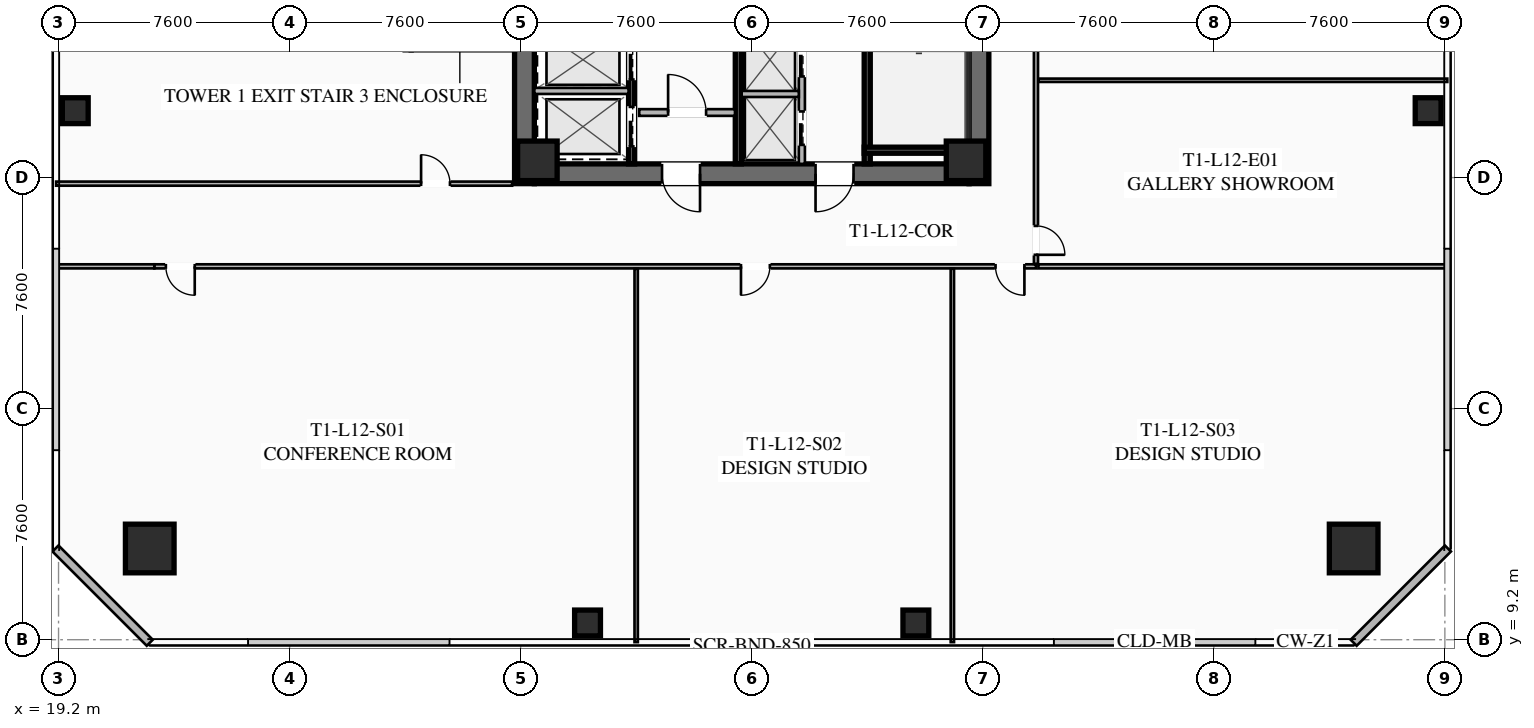
"""IFC4 building model, lengths in metres.
Left out: names, types, materials, properties, quantities, classifications, styles, units other than length and angle.
Written with IfcOpenShell. Run it as: python <this file> out.ifc"""

import sys

from ifc_helpers import new_model, si_unit, direction, frame, frame_2d, origin, origin_2d, place, context, subcontext, project, spatial, rectangle, hollow_rectangle, extrude, element, fill, save


model = new_model("IFC4")
c1 = context("Model", 3, precision=1e-05, world=origin(), true_north=direction((0.0, 1.0)))
c2 = subcontext(c1, "Body", "Model", "MODEL_VIEW")
j1 = project(units=[si_unit("LENGTHUNIT", "METRE"), si_unit("PLANEANGLEUNIT", "RADIAN")], contexts=[c1])
p1 = place(None, origin())
s1 = spatial("IfcSite", under=j1, at=p1, CompositionType="ELEMENT")
p2 = place(p1, origin())
s2 = spatial("IfcBuilding", under=s1, at=p2, CompositionType="ELEMENT")
p3 = place(p2, frame((0.0, 0.0, 49.45)))
s3 = spatial("IfcBuildingStorey", under=s2, at=p3, CompositionType="ELEMENT", Elevation=49.45)
for number, where, z_axis, x_axis in (
    (1, (34.525, 24.2, 0.0), (0.0, 0.0, 1.0), (0.0, 1.0, 0.0)),
    (2, (49.475, 39.8, 0.0), (0.0, 0.0, 1.0), (0.0, -1.0, 0.0)),
):
    element("IfcWall", number, at=place(p3, frame(where, z_axis=z_axis, x_axis=x_axis)), inside=s3, PredefinedType="SHEAR", context=c2, shape_type="SweptSolid", body=[
        extrude(rectangle(XDim=15.6, YDim=0.65, at=frame_2d((7.8, 0.0))), origin(), (0.0, 0.0, 1.0), 3.55),
    ])
p4 = place(p3, frame((49.15, 24.525, 0.0), z_axis=(0.0, 0.0, 1.0), x_axis=(-1.0, 0.0, 0.0)))
e3 = element("IfcWall", 3, at=p4, inside=s3, PredefinedType="SHEAR", context=c2, shape_type="SweptSolid", body=[
    extrude(rectangle(XDim=14.3, YDim=0.65, at=frame_2d((7.15, 0.0))), origin(), (0.0, 0.0, 1.0), 3.55),
])
p5 = place(p4, frame((8.85, 0.0, 0.0)))
e4 = element("IfcOpeningElement", 4, at=p5, cuts=e3, PredefinedType="OPENING", context=c2, shape_type="SweptSolid", body=[
    extrude(rectangle(XDim=1.25, YDim=2.25, at=frame_2d((0.625, 1.125))), frame((0.0, 0.335, 0.0), z_axis=(0.0, -1.0, 0.0), x_axis=(1.0, 0.0, 0.0)), (0.0, 0.0, 1.0), 0.67),
])
p6 = place(p4, frame((3.8, 0.0, 0.0)))
e5 = element("IfcOpeningElement", 5, at=p6, cuts=e3, PredefinedType="OPENING", context=c2, shape_type="SweptSolid", body=[
    extrude(rectangle(XDim=1.25, YDim=2.25, at=frame_2d((0.625, 1.125))), frame((0.0, 0.335, 0.0), z_axis=(0.0, -1.0, 0.0), x_axis=(1.0, 0.0, 0.0)), (0.0, 0.0, 1.0), 0.67),
])
for number, where, z_axis, x_axis in (
    (6, (34.95, 24.95, 0.0), (0.0, 0.0, 1.0), (1.0, 0.0, 0.0)),
    (7, (49.05, 24.95, 0.0), (0.0, 0.0, 1.0), (1.0, 0.0, 0.0)),
):
    element("IfcColumn", number, at=place(p3, frame(where, z_axis=z_axis, x_axis=x_axis)), inside=s3, PredefinedType="COLUMN", context=c2, shape_type="SweptSolid", body=[
        extrude(hollow_rectangle(XDim=1.3, YDim=1.3, WallThickness=0.05, at=origin_2d()), origin(), (0.0, 0.0, 1.0), 3.35),
    ])
for number, where, z_axis, x_axis in (
    (8, (22.2, 12.2, 0.0), (0.0, 0.0, 1.0), (1.0, 0.0, 0.0)),
    (9, (61.8, 12.2, 0.0), (0.0, 0.0, 1.0), (1.0, 0.0, 0.0)),
):
    element("IfcColumn", number, at=place(p3, frame(where, z_axis=z_axis, x_axis=x_axis)), inside=s3, PredefinedType="COLUMN", context=c2, shape_type="SweptSolid", body=[
        extrude(hollow_rectangle(XDim=1.6, YDim=1.6, WallThickness=0.06, at=origin_2d()), origin(), (0.0, 0.0, 1.0), 3.35),
    ])
for number, where, z_axis, x_axis in (
    (10, (36.6, 9.75, 0.0), (0.0, 0.0, 1.0), (1.0, 0.0, 0.0)),
    (11, (47.4, 9.75, 0.0), (0.0, 0.0, 1.0), (1.0, 0.0, 0.0)),
    (12, (64.25, 26.6, 0.0), (0.0, 0.0, 1.0), (1.0, 0.0, 0.0)),
    (13, (19.75, 26.6, 0.0), (0.0, 0.0, 1.0), (1.0, 0.0, 0.0)),
):
    element("IfcColumn", number, at=place(p3, frame(where, z_axis=z_axis, x_axis=x_axis)), inside=s3, PredefinedType="COLUMN", context=c2, shape_type="SweptSolid", body=[
        extrude(hollow_rectangle(XDim=0.85, YDim=0.85, WallThickness=0.035, at=origin_2d()), origin(), (0.0, 0.0, 1.0), 3.35),
    ])
for number, where, z_axis, x_axis in (
    (14, (22.2, 9.1, 0.0), (0.0, 0.0, 1.0), (-0.707, 0.707, 0.0)),
    (15, (64.9, 12.2, 0.0), (0.0, 0.0, 1.0), (-0.707, -0.707, 0.0)),
):
    element("IfcWall", number, at=place(p3, frame(where, z_axis=z_axis, x_axis=x_axis)), inside=s3, PredefinedType="SOLIDWALL", context=c2, shape_type="SweptSolid", body=[
        extrude(rectangle(XDim=4.384, YDim=0.28, at=frame_2d((2.192, 0.0))), origin(), (0.0, 0.0, 1.0), 3.35),
    ])
p7 = place(p3, frame((45.8, 32.8, 0.0), z_axis=(0.0, 0.0, 1.0), x_axis=(0.0, -1.0, 0.0)))
e16 = element("IfcWall", 16, at=p7, inside=s3, PredefinedType="SHEAR", context=c2, shape_type="SweptSolid", body=[
    extrude(rectangle(XDim=7.95, YDim=0.2, at=frame_2d((3.975, 0.0))), origin(), (0.0, 0.0, 1.0), 3.35),
])
p8 = place(p7, frame((0.45, 0.0, 0.0)))
e17 = element("IfcOpeningElement", 17, at=p8, cuts=e16, PredefinedType="OPENING", context=c2, shape_type="SweptSolid", body=[
    extrude(rectangle(XDim=1.15, YDim=2.2, at=frame_2d((0.575, 1.1))), frame((0.0, 0.11, 0.0), z_axis=(0.0, -1.0, 0.0), x_axis=(1.0, 0.0, 0.0)), (0.0, 0.0, 1.0), 0.22),
])
p9 = place(p3, frame((45.7, 25.3, 0.0), z_axis=(0.0, 0.0, 1.0), x_axis=(1.0, 0.0, 0.0)))
e18 = element("IfcWall", 18, at=p9, inside=s3, PredefinedType="SHEAR", context=c2, shape_type="SweptSolid", body=[
    extrude(rectangle(XDim=3.45, YDim=0.2, at=frame_2d((1.725, 0.0))), origin(), (0.0, 0.0, 1.0), 3.35),
])
p10 = place(p3, frame((41.56, 24.85, 0.0), z_axis=(0.0, 0.0, 1.0), x_axis=(0.0, 1.0, 0.0)))
e19 = element("IfcWall", 19, at=p10, inside=s3, PredefinedType="SHEAR", context=c2, shape_type="SweptSolid", body=[
    extrude(rectangle(XDim=14.3, YDim=0.2, at=frame_2d((7.15, 0.0))), origin(), (0.0, 0.0, 1.0), 3.35),
])
p11 = place(p3, frame((38.3, 26.54, 0.0), z_axis=(0.0, 0.0, 1.0), x_axis=(1.0, 0.0, 0.0)))
e20 = element("IfcWall", 20, at=p11, inside=s3, PredefinedType="SOLIDWALL", context=c2, shape_type="SweptSolid", body=[
    extrude(rectangle(XDim=3.15, YDim=0.22, at=frame_2d((1.575, 0.0))), origin(), (0.0, 0.0, 1.0), 2.703),
])
p12 = place(p11, frame((0.95, 0.0, 0.0)))
e21 = element("IfcOpeningElement", 21, at=p12, cuts=e20, PredefinedType="OPENING", context=c2, shape_type="SweptSolid", body=[
    extrude(rectangle(XDim=1.25, YDim=2.25, at=frame_2d((0.625, 1.125))), frame((0.0, 0.12, 0.0), z_axis=(0.0, -1.0, 0.0), x_axis=(1.0, 0.0, 0.0)), (0.0, 0.0, 1.0), 0.24),
])
p13 = place(p3, frame((38.05, 24.85, 0.0), z_axis=(0.0, 0.0, 1.0), x_axis=(0.0, 1.0, 0.0)))
e22 = element("IfcWall", 22, at=p13, inside=s3, PredefinedType="SHEAR", context=c2, shape_type="SweptSolid", body=[
    extrude(rectangle(XDim=6.35, YDim=0.2, at=frame_2d((3.175, 0.0))), origin(), (0.0, 0.0, 1.0), 3.35),
])
p14 = place(p13, frame((4.775, 0.0, 0.0)))
e23 = element("IfcOpeningElement", 23, at=p14, cuts=e22, PredefinedType="OPENING", context=c2, shape_type="SweptSolid", body=[
    extrude(rectangle(XDim=1.3, YDim=2.25, at=frame_2d((0.65, 1.125))), frame((0.0, 0.11, 0.0), z_axis=(0.0, -1.0, 0.0), x_axis=(1.0, 0.0, 0.0)), (0.0, 0.0, 1.0), 0.22),
])
p15 = place(p13, frame((2.775, 0.0, 0.0)))
e24 = element("IfcOpeningElement", 24, at=p15, cuts=e22, PredefinedType="OPENING", context=c2, shape_type="SweptSolid", body=[
    extrude(rectangle(XDim=1.3, YDim=2.25, at=frame_2d((0.65, 1.125))), frame((0.0, 0.11, 0.0), z_axis=(0.0, -1.0, 0.0), x_axis=(1.0, 0.0, 0.0)), (0.0, 0.0, 1.0), 0.22),
])
p16 = place(p13, frame((0.575, 0.0, 0.0)))
e25 = element("IfcOpeningElement", 25, at=p16, cuts=e22, PredefinedType="OPENING", context=c2, shape_type="SweptSolid", body=[
    extrude(rectangle(XDim=1.3, YDim=2.25, at=frame_2d((0.65, 1.125))), frame((0.0, 0.11, 0.0), z_axis=(0.0, -1.0, 0.0), x_axis=(1.0, 0.0, 0.0)), (0.0, 0.0, 1.0), 0.22),
])
p17 = place(p3, frame((34.85, 27.25, 0.0), z_axis=(0.0, 0.0, 1.0), x_axis=(1.0, 0.0, 0.0)))
e26 = element("IfcWall", 26, at=p17, inside=s3, PredefinedType="SOLIDWALL", context=c2, shape_type="SweptSolid", body=[
    extrude(rectangle(XDim=3.1, YDim=0.2, at=frame_2d((1.55, 0.0))), origin(), (0.0, 0.0, 1.0), 3.35),
])
p18 = place(p3, frame((43.65, 24.85, 0.0), z_axis=(0.0, 0.0, 1.0), x_axis=(0.0, 1.0, 0.0)))
e27 = element("IfcWall", 27, at=p18, inside=s3, PredefinedType="SOLIDWALL", context=c2, shape_type="SweptSolid", body=[
    extrude(rectangle(XDim=6.8, YDim=0.2, at=frame_2d((3.4, 0.0))), origin(), (0.0, 0.0, 1.0), 3.35),
])
p19 = place(p18, frame((0.625, 0.0, 0.0)))
e28 = element("IfcOpeningElement", 28, at=p19, cuts=e27, PredefinedType="OPENING", context=c2, shape_type="SweptSolid", body=[
    extrude(rectangle(XDim=1.1, YDim=2.2, at=frame_2d((0.55, 1.1))), frame((0.0, 0.11, 0.0), z_axis=(0.0, -1.0, 0.0), x_axis=(1.0, 0.0, 0.0)), (0.0, 0.0, 1.0), 0.22),
])
p20 = place(p18, frame((2.875, 0.0, 0.0)))
e29 = element("IfcOpeningElement", 29, at=p20, cuts=e27, PredefinedType="OPENING", context=c2, shape_type="SweptSolid", body=[
    extrude(rectangle(XDim=1.1, YDim=2.2, at=frame_2d((0.55, 1.1))), frame((0.0, 0.11, 0.0), z_axis=(0.0, -1.0, 0.0), x_axis=(1.0, 0.0, 0.0)), (0.0, 0.0, 1.0), 0.22),
])
p21 = place(p18, frame((5.125, 0.0, 0.0)))
e30 = element("IfcOpeningElement", 30, at=p21, cuts=e27, PredefinedType="OPENING", context=c2, shape_type="SweptSolid", body=[
    extrude(rectangle(XDim=1.1, YDim=2.2, at=frame_2d((0.55, 1.1))), frame((0.0, 0.11, 0.0), z_axis=(0.0, -1.0, 0.0), x_axis=(1.0, 0.0, 0.0)), (0.0, 0.0, 1.0), 0.22),
])
p22 = place(p3, frame((41.67, 27.15, 0.0), z_axis=(0.0, 0.0, 1.0), x_axis=(1.0, 0.0, 0.0)))
e31 = element("IfcWall", 31, at=p22, inside=s3, PredefinedType="SOLIDWALL", context=c2, shape_type="SweptSolid", body=[
    extrude(rectangle(XDim=1.88, YDim=0.2, at=frame_2d((0.94, 0.0))), origin(), (0.0, 0.0, 1.0), 3.35),
])
p23 = place(p3, frame((51.35, 21.48, 0.0), z_axis=(0.0, 0.0, 1.0), x_axis=(-1.0, 0.0, 0.0)))
e32 = element("IfcWall", 32, at=p23, inside=s3, PredefinedType="PARTITIONING", context=c2, shape_type="SweptSolid", body=[
    extrude(rectangle(XDim=29.0, YDim=0.135, at=frame_2d((14.5, 0.0))), origin(), (0.0, 0.0, 1.0), 2.703),
])
p24 = place(p23, frame((27.67, 0.0, 0.0)))
e33 = element("IfcOpeningElement", 33, at=p24, cuts=e32, PredefinedType="OPENING", context=c2, shape_type="SweptSolid", body=[
    extrude(rectangle(XDim=0.95, YDim=2.05, at=frame_2d((0.475, 1.025))), frame((0.0, 0.077, 0.0), z_axis=(0.0, -1.0, 0.0), x_axis=(1.0, 0.0, 0.0)), (0.0, 0.0, 1.0), 0.155),
])
p25 = place(p23, frame((8.753, 0.0, 0.0)))
e34 = element("IfcOpeningElement", 34, at=p25, cuts=e32, PredefinedType="OPENING", context=c2, shape_type="SweptSolid", body=[
    extrude(rectangle(XDim=0.95, YDim=2.05, at=frame_2d((0.475, 1.025))), frame((0.0, 0.077, 0.0), z_axis=(0.0, -1.0, 0.0), x_axis=(1.0, 0.0, 0.0)), (0.0, 0.0, 1.0), 0.155),
])
p26 = place(p23, frame((0.38, 0.0, 0.0)))
e35 = element("IfcOpeningElement", 35, at=p26, cuts=e32, PredefinedType="OPENING", context=c2, shape_type="SweptSolid", body=[
    extrude(rectangle(XDim=0.95, YDim=2.05, at=frame_2d((0.475, 1.025))), frame((0.0, 0.077, 0.0), z_axis=(0.0, -1.0, 0.0), x_axis=(1.0, 0.0, 0.0)), (0.0, 0.0, 1.0), 0.155),
])
p27 = place(p3, frame((19.12, 21.48, 0.0), z_axis=(0.0, 0.0, 1.0), x_axis=(1.0, 0.0, 0.0)))
e36 = element("IfcWall", 36, at=p27, inside=s3, PredefinedType="PARTITIONING", context=c2, shape_type="SweptSolid", body=[
    extrude(rectangle(XDim=3.23, YDim=0.135, at=frame_2d((1.615, 0.0))), origin(), (0.0, 0.0, 1.0), 2.703),
])
for number, where, z_axis, x_axis in (
    (37, (38.2, 9.12, 0.0), (0.0, 0.0, 1.0), (0.0, 1.0, 0.0)),
    (38, (48.6, 9.12, 0.0), (0.0, 0.0, 1.0), (0.0, 1.0, 0.0)),
):
    element("IfcWall", number, at=place(p3, frame(where, z_axis=z_axis, x_axis=x_axis)), inside=s3, PredefinedType="PARTITIONING", context=c2, shape_type="SweptSolid", body=[
        extrude(rectangle(XDim=12.28, YDim=0.11, at=frame_2d((6.14, 0.0))), origin(), (0.0, 0.0, 1.0), 2.703),
    ])
p28 = place(p3, frame((51.35, 41.27, 0.0), z_axis=(0.0, 0.0, 1.0), x_axis=(0.0, -1.0, 0.0)))
e39 = element("IfcWall", 39, at=p28, inside=s3, PredefinedType="PARTITIONING", context=c2, shape_type="SweptSolid", body=[
    extrude(rectangle(XDim=19.71, YDim=0.135, at=frame_2d((9.855, 0.0))), origin(), (0.0, 0.0, 1.0), 2.703),
])
p29 = place(p28, frame((18.46, 0.0, 0.0)))
e40 = element("IfcOpeningElement", 40, at=p29, cuts=e39, PredefinedType="OPENING", context=c2, shape_type="SweptSolid", body=[
    extrude(rectangle(XDim=0.95, YDim=2.05, at=frame_2d((0.475, 1.025))), frame((0.0, 0.077, 0.0), z_axis=(0.0, -1.0, 0.0), x_axis=(1.0, 0.0, 0.0)), (0.0, 0.0, 1.0), 0.155),
])
p30 = place(p28, frame((8.577, 0.0, 0.0)))
e41 = element("IfcOpeningElement", 41, at=p30, cuts=e39, PredefinedType="OPENING", context=c2, shape_type="SweptSolid", body=[
    extrude(rectangle(XDim=0.95, YDim=2.05, at=frame_2d((0.475, 1.025))), frame((0.0, 0.077, 0.0), z_axis=(0.0, -1.0, 0.0), x_axis=(1.0, 0.0, 0.0)), (0.0, 0.0, 1.0), 0.155),
])
p31 = place(p3, frame((51.43, 21.48, 0.0), z_axis=(0.0, 0.0, 1.0), x_axis=(1.0, 0.0, 0.0)))
e42 = element("IfcWall", 42, at=p31, inside=s3, PredefinedType="PARTITIONING", context=c2, shape_type="SweptSolid", body=[
    extrude(rectangle(XDim=13.45, YDim=0.135, at=frame_2d((6.725, 0.0))), origin(), (0.0, 0.0, 1.0), 2.703),
])
p32 = place(p3, frame((51.43, 27.6, 0.0), z_axis=(0.0, 0.0, 1.0), x_axis=(1.0, 0.0, 0.0)))
e43 = element("IfcWall", 43, at=p32, inside=s3, PredefinedType="PARTITIONING", context=c2, shape_type="SweptSolid", body=[
    extrude(rectangle(XDim=13.45, YDim=0.11, at=frame_2d((6.725, 0.0))), origin(), (0.0, 0.0, 1.0), 2.703),
])
p33 = place(p3, frame((19.12, 24.2, 0.0), z_axis=(0.0, 0.0, 1.0), x_axis=(1.0, 0.0, 0.0)))
e44 = element("IfcWall", 44, at=p33, inside=s3, PredefinedType="PARTITIONING", context=c2, shape_type="SweptSolid", body=[
    extrude(rectangle(XDim=15.0, YDim=0.135, at=frame_2d((7.5, 0.0))), origin(), (0.0, 0.0, 1.0), 2.703),
])
p34 = place(p33, frame((12.005, 0.0, 0.0)))
e45 = element("IfcOpeningElement", 45, at=p34, cuts=e44, PredefinedType="OPENING", context=c2, shape_type="SweptSolid", body=[
    extrude(rectangle(XDim=0.95, YDim=2.05, at=frame_2d((0.475, 1.025))), frame((0.0, 0.077, 0.0), z_axis=(0.0, -1.0, 0.0), x_axis=(1.0, 0.0, 0.0)), (0.0, 0.0, 1.0), 0.155),
])
p35 = place(p5, origin())
e46 = element("IfcDoor", 46, at=p35, inside=s3, OperationType="SINGLE_SWING_LEFT", PredefinedType="DOOR", context=c2, shape_type="SweptSolid", body=[
    extrude(rectangle(XDim=1.25, YDim=2.25, at=frame_2d((0.625, 1.125))), frame((0.0, 0.025, 0.0), z_axis=(0.0, -1.0, 0.0), x_axis=(1.0, 0.0, 0.0)), (0.0, 0.0, 1.0), 0.05),
])
fill(e4, e46)
p36 = place(p6, origin())
e47 = element("IfcDoor", 47, at=p36, inside=s3, OperationType="SINGLE_SWING_RIGHT", PredefinedType="DOOR", context=c2, shape_type="SweptSolid", body=[
    extrude(rectangle(XDim=1.25, YDim=2.25, at=frame_2d((0.625, 1.125))), frame((0.0, 0.025, 0.0), z_axis=(0.0, -1.0, 0.0), x_axis=(1.0, 0.0, 0.0)), (0.0, 0.0, 1.0), 0.05),
])
fill(e5, e47)
p37 = place(p12, origin())
e48 = element("IfcDoor", 48, at=p37, inside=s3, OperationType="SINGLE_SWING_LEFT", PredefinedType="DOOR", context=c2, shape_type="SweptSolid", body=[
    extrude(rectangle(XDim=1.25, YDim=2.25, at=frame_2d((0.625, 1.125))), frame((0.0, 0.025, 0.0), z_axis=(0.0, -1.0, 0.0), x_axis=(1.0, 0.0, 0.0)), (0.0, 0.0, 1.0), 0.05),
])
fill(e21, e48)
p38 = place(p24, origin())
e49 = element("IfcDoor", 49, at=p38, inside=s3, OperationType="SINGLE_SWING_LEFT", PredefinedType="DOOR", context=c2, shape_type="SweptSolid", body=[
    extrude(rectangle(XDim=0.95, YDim=2.05, at=frame_2d((0.475, 1.025))), frame((0.0, 0.025, 0.0), z_axis=(0.0, -1.0, 0.0), x_axis=(1.0, 0.0, 0.0)), (0.0, 0.0, 1.0), 0.05),
])
fill(e33, e49)
p39 = place(p25, origin())
e50 = element("IfcDoor", 50, at=p39, inside=s3, OperationType="SINGLE_SWING_RIGHT", PredefinedType="DOOR", context=c2, shape_type="SweptSolid", body=[
    extrude(rectangle(XDim=0.95, YDim=2.05, at=frame_2d((0.475, 1.025))), frame((0.0, 0.025, 0.0), z_axis=(0.0, -1.0, 0.0), x_axis=(1.0, 0.0, 0.0)), (0.0, 0.0, 1.0), 0.05),
])
fill(e34, e50)
p40 = place(p26, origin())
e51 = element("IfcDoor", 51, at=p40, inside=s3, OperationType="SINGLE_SWING_LEFT", PredefinedType="DOOR", context=c2, shape_type="SweptSolid", body=[
    extrude(rectangle(XDim=0.95, YDim=2.05, at=frame_2d((0.475, 1.025))), frame((0.0, 0.025, 0.0), z_axis=(0.0, -1.0, 0.0), x_axis=(1.0, 0.0, 0.0)), (0.0, 0.0, 1.0), 0.05),
])
fill(e35, e51)
p41 = place(p29, origin())
e52 = element("IfcDoor", 52, at=p41, inside=s3, OperationType="SINGLE_SWING_RIGHT", PredefinedType="DOOR", context=c2, shape_type="SweptSolid", body=[
    extrude(rectangle(XDim=0.95, YDim=2.05, at=frame_2d((0.475, 1.025))), frame((0.0, 0.025, 0.0), z_axis=(0.0, -1.0, 0.0), x_axis=(1.0, 0.0, 0.0)), (0.0, 0.0, 1.0), 0.05),
])
fill(e40, e52)
p42 = place(p34, origin())
e53 = element("IfcDoor", 53, at=p42, inside=s3, OperationType="SINGLE_SWING_LEFT", PredefinedType="DOOR", context=c2, shape_type="SweptSolid", body=[
    extrude(rectangle(XDim=0.95, YDim=2.05, at=frame_2d((0.475, 1.025))), frame((0.0, 0.025, 0.0), z_axis=(0.0, -1.0, 0.0), x_axis=(1.0, 0.0, 0.0)), (0.0, 0.0, 1.0), 0.05),
])
fill(e45, e53)
p43 = place(p15, origin())
e54 = element("IfcDoor", 54, at=p43, inside=s3, OperationType="SLIDING_TO_LEFT", PredefinedType="DOOR", context=c2, shape_type="SweptSolid", body=[
    extrude(rectangle(XDim=1.3, YDim=2.25, at=frame_2d((0.65, 1.125))), frame((0.0, 0.025, 0.0), z_axis=(0.0, -1.0, 0.0), x_axis=(1.0, 0.0, 0.0)), (0.0, 0.0, 1.0), 0.05),
])
fill(e24, e54)
p44 = place(p16, origin())
e55 = element("IfcDoor", 55, at=p44, inside=s3, OperationType="SLIDING_TO_LEFT", PredefinedType="DOOR", context=c2, shape_type="SweptSolid", body=[
    extrude(rectangle(XDim=1.3, YDim=2.25, at=frame_2d((0.65, 1.125))), frame((0.0, 0.025, 0.0), z_axis=(0.0, -1.0, 0.0), x_axis=(1.0, 0.0, 0.0)), (0.0, 0.0, 1.0), 0.05),
])
fill(e25, e55)
p45 = place(p19, origin())
e56 = element("IfcDoor", 56, at=p45, inside=s3, OperationType="SLIDING_TO_LEFT", PredefinedType="DOOR", context=c2, shape_type="SweptSolid", body=[
    extrude(rectangle(XDim=1.1, YDim=2.2, at=frame_2d((0.55, 1.1))), frame((0.0, 0.025, 0.0), z_axis=(0.0, -1.0, 0.0), x_axis=(1.0, 0.0, 0.0)), (0.0, 0.0, 1.0), 0.05),
])
fill(e28, e56)
p46 = place(p20, origin())
e57 = element("IfcDoor", 57, at=p46, inside=s3, OperationType="SLIDING_TO_LEFT", PredefinedType="DOOR", context=c2, shape_type="SweptSolid", body=[
    extrude(rectangle(XDim=1.1, YDim=2.2, at=frame_2d((0.55, 1.1))), frame((0.0, 0.025, 0.0), z_axis=(0.0, -1.0, 0.0), x_axis=(1.0, 0.0, 0.0)), (0.0, 0.0, 1.0), 0.05),
])
fill(e29, e57)
save(model, sys.argv[1])
